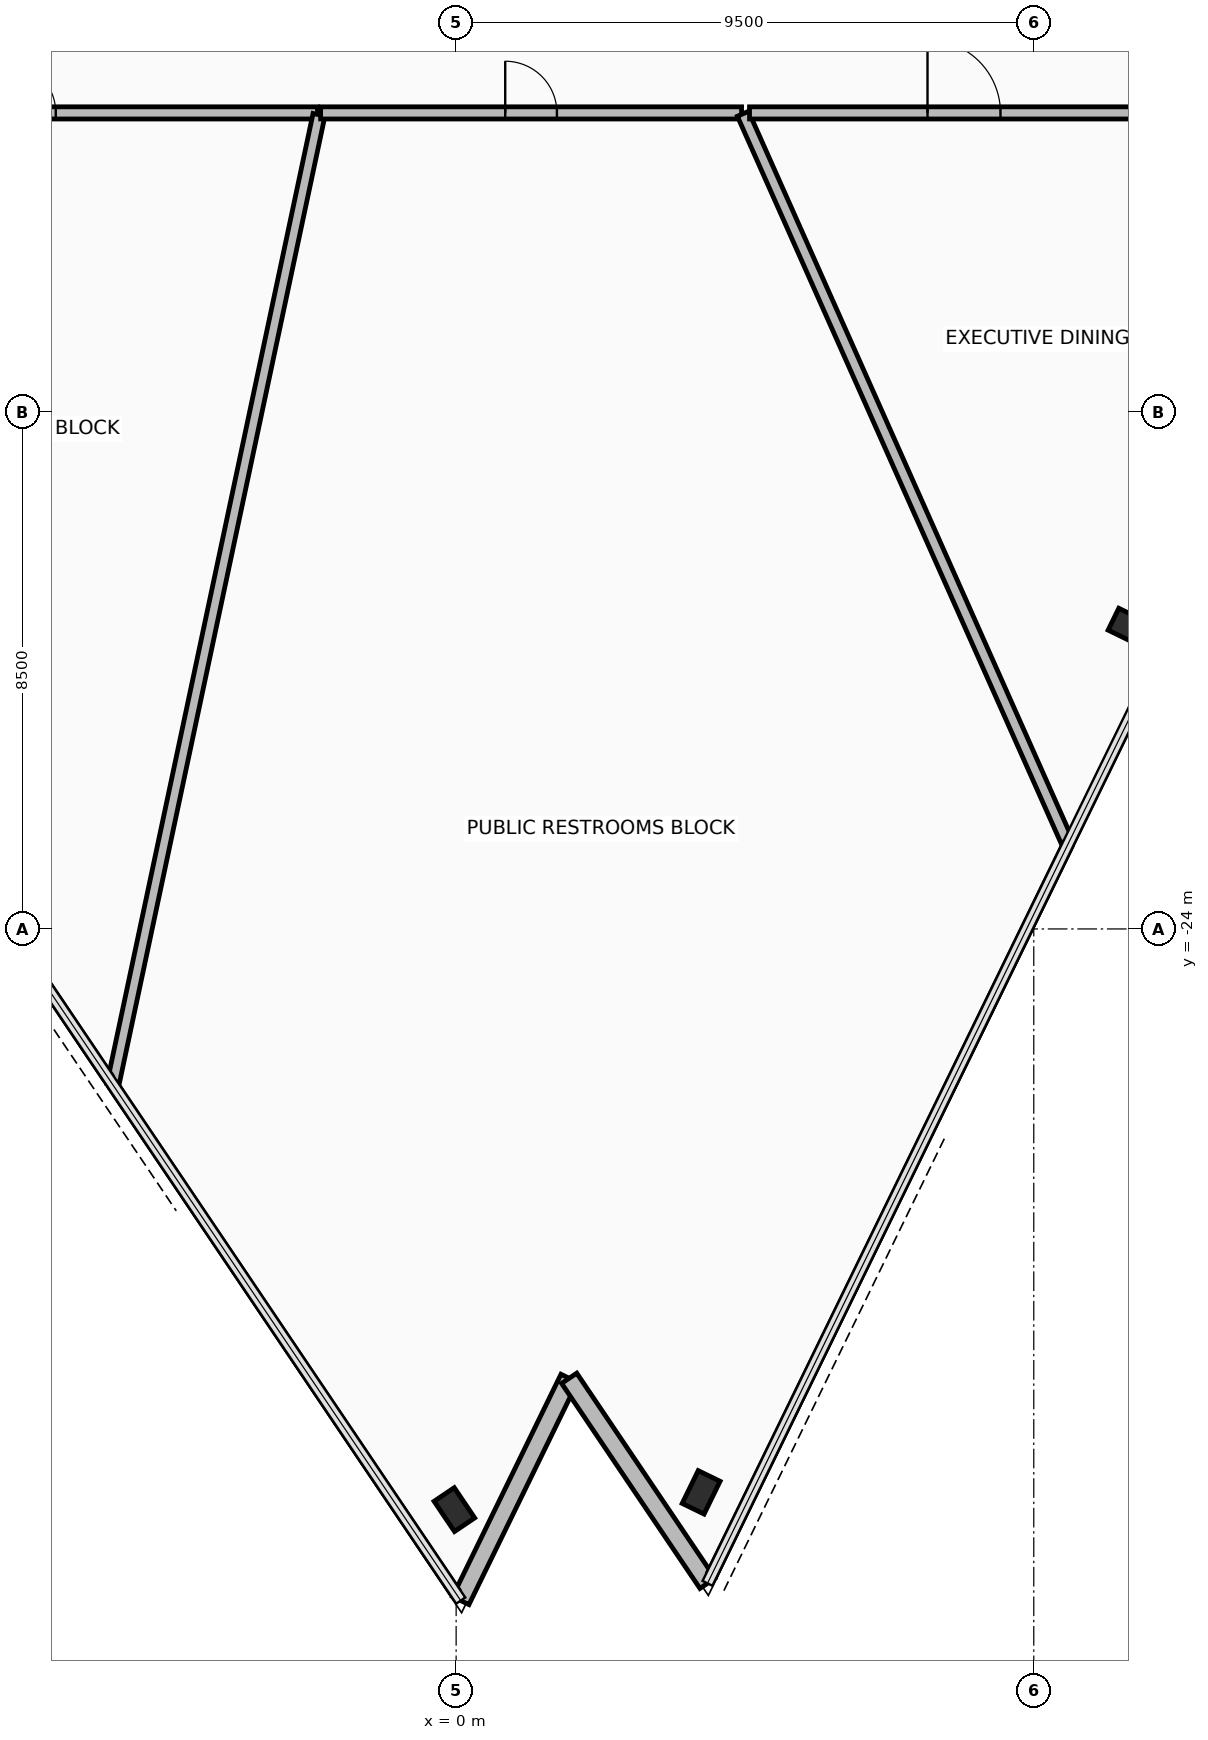
"""IFC4 building model, lengths in metres.
Left out: names, types, materials, properties, quantities, classifications, styles, units other than length and angle.
Written with IfcOpenShell. Run it as: python <this file> out.ifc"""

import sys

from ifc_helpers import new_model, si_unit, direction, frame, frame_2d, origin, origin_2d, place, context, subcontext, project, spatial, rectangle, hollow_rectangle, extrude, element, fill, save


model = new_model("IFC4")
c1 = context("Model", 3, precision=1e-05, world=origin(), true_north=direction((0.0, 1.0)))
c2 = subcontext(c1, "Body", "Model", "MODEL_VIEW")
j1 = project(units=[si_unit("LENGTHUNIT", "METRE"), si_unit("PLANEANGLEUNIT", "RADIAN")], contexts=[c1])
p1 = place(None, origin())
s1 = spatial("IfcSite", under=j1, at=p1, CompositionType="ELEMENT")
p2 = place(p1, origin())
s2 = spatial("IfcBuilding", under=s1, at=p2, CompositionType="ELEMENT")
p3 = place(p2, frame((0.0, 0.0, 260.6)))
s3 = spatial("IfcBuildingStorey", under=s2, at=p3, CompositionType="ELEMENT", Elevation=260.6)
for number, where, z_axis, x_axis in (
    (1, (-0.029, -33.549, 0.0), (0.0, 0.0, 1.0), (-0.559, 0.829, 0.0)),
    (2, (4.029, -33.265, 0.0), (0.0, 0.0, 1.0), (0.438, 0.899, 0.0)),
):
    element("IfcColumn", number, at=place(p3, frame(where, z_axis=z_axis, x_axis=x_axis)), inside=s3, PredefinedType="COLUMN", context=c2, shape_type="SweptSolid", body=[
        extrude(hollow_rectangle(XDim=0.4, YDim=0.6, WallThickness=0.03, at=origin_2d()), origin(), (0.0, 0.0, 1.0), 3.6),
    ])
p4 = place(p3, frame((10.99, -18.994, 0.0), z_axis=(0.0, 0.0, 1.0), x_axis=(0.43837271548, 0.898793281196, 0.0)))
e3 = element("IfcColumn", 3, at=p4, inside=s3, PredefinedType="COLUMN", context=c2, shape_type="SweptSolid", body=[
    extrude(hollow_rectangle(XDim=0.4, YDim=0.4, WallThickness=0.025, at=origin_2d()), origin(), (0.0, 0.0, 1.0), 3.6),
])
p5 = place(p3, frame((0.076, -35.045, 0.0), z_axis=(0.0, 0.0, 1.0), x_axis=(0.438357414153, 0.898800744024, 0.0)))
e4 = element("IfcWall", 4, at=p5, inside=s3, PredefinedType="STANDARD", context=c2, shape_type="SweptSolid", body=[
    extrude(rectangle(XDim=4.068, YDim=0.3, at=frame_2d((2.034, 0.0))), origin(), (0.0, 0.0, 1.0), 2.765),
])
p6 = place(p3, frame((1.859, -31.389, 0.0), z_axis=(0.0, 0.0, 1.0), x_axis=(0.559206900681, -0.829028131145, 0.0)))
e5 = element("IfcWall", 5, at=p6, inside=s3, PredefinedType="STANDARD", context=c2, shape_type="SweptSolid", body=[
    extrude(rectangle(XDim=4.068, YDim=0.3, at=frame_2d((2.034, 0.0))), origin(), (0.0, 0.0, 1.0), 2.765),
])
p7 = place(p3, frame((-11.741, -10.58, 0.0), z_axis=(0.0, 0.0, 1.0), x_axis=(1.0, 0.0, 0.0)))
e6 = element("IfcWall", 6, at=p7, inside=s3, PredefinedType="PARTITIONING", context=c2, shape_type="SweptSolid", body=[
    extrude(rectangle(XDim=9.461, YDim=0.2, at=frame_2d((4.73, 0.0))), origin(), (0.0, 0.0, 1.0), 2.915),
])
p8 = place(p7, frame((4.306, 0.0, 0.0)))
e7 = element("IfcOpeningElement", 7, at=p8, cuts=e6, PredefinedType="OPENING", context=c2, shape_type="SweptSolid", body=[
    extrude(rectangle(XDim=0.85, YDim=2.1, at=frame_2d((0.425, 1.05))), frame((0.0, 0.11, 0.0), z_axis=(0.0, -1.0, 0.0), x_axis=(1.0, 0.0, 0.0)), (0.0, 0.0, 1.0), 0.22),
])
p9 = place(p3, frame((-2.255, -10.61, 0.0), z_axis=(0.0, 0.0, 1.0), x_axis=(-0.207902262157, -0.97814960481, 0.0)))
e8 = element("IfcWall", 8, at=p9, inside=s3, PredefinedType="PARTITIONING", context=c2, shape_type="SweptSolid", body=[
    extrude(rectangle(XDim=16.309, YDim=0.2, at=frame_2d((8.154, 0.0))), origin(), (0.0, 0.0, 1.0), 2.765),
])
p10 = place(p3, frame((-5.728, -26.441, 0.0), z_axis=(0.0, 0.0, 1.0), x_axis=(-0.559188397691, 0.829040611724, 0.0)))
e9 = element("IfcWall", 9, at=p10, inside=s3, PredefinedType="PARTITIONING", context=c2, shape_type="SweptSolid", body=[
    extrude(rectangle(XDim=15.951, YDim=0.15, at=frame_2d((7.976, 0.0))), origin(), (0.0, 0.0, 1.0), 3.42),
])
p11 = place(p3, frame((-0.024, -34.897, 0.0), z_axis=(0.0, 0.0, 1.0), x_axis=(-0.559196847428, 0.829034912309, 0.0)))
e10 = element("IfcWall", 10, at=p11, inside=s3, PredefinedType="PARTITIONING", context=c2, shape_type="SweptSolid", body=[
    extrude(rectangle(XDim=10.043, YDim=0.15, at=frame_2d((5.021, 0.0))), origin(), (0.0, 0.0, 1.0), 3.42),
])
p12 = place(p3, frame((-2.229, -10.58, 0.0), z_axis=(0.0, 0.0, 1.0), x_axis=(1.0, 0.0, 0.0)))
e11 = element("IfcWall", 11, at=p12, inside=s3, PredefinedType="PARTITIONING", context=c2, shape_type="SweptSolid", body=[
    extrude(rectangle(XDim=6.923, YDim=0.2, at=frame_2d((3.461, 0.0))), origin(), (0.0, 0.0, 1.0), 3.42),
])
p13 = place(p12, frame((3.036, 0.0, 0.0)))
e12 = element("IfcOpeningElement", 12, at=p13, cuts=e11, PredefinedType="OPENING", context=c2, shape_type="SweptSolid", body=[
    extrude(rectangle(XDim=0.85, YDim=2.1, at=frame_2d((0.425, 1.05))), frame((0.0, 0.11, 0.0), z_axis=(0.0, -1.0, 0.0), x_axis=(1.0, 0.0, 0.0)), (0.0, 0.0, 1.0), 0.22),
])
p14 = place(p3, frame((4.717, -10.595, 0.0), z_axis=(0.0, 0.0, 1.0), x_axis=(0.406740308305, -0.913543825769, 0.0)))
e13 = element("IfcWall", 13, at=p14, inside=s3, PredefinedType="PARTITIONING", context=c2, shape_type="SweptSolid", body=[
    extrude(rectangle(XDim=13.134, YDim=0.2, at=frame_2d((6.567, 0.0))), origin(), (0.0, 0.0, 1.0), 2.765),
])
p15 = place(p3, frame((10.059, -22.614, 0.0), z_axis=(0.0, 0.0, 1.0), x_axis=(-0.438368087018, -0.898795538643, 0.0)))
e14 = element("IfcWall", 14, at=p15, inside=s3, PredefinedType="PARTITIONING", context=c2, shape_type="SweptSolid", body=[
    extrude(rectangle(XDim=13.336, YDim=0.15, at=frame_2d((6.668, 0.0))), origin(), (0.0, 0.0, 1.0), 3.42),
])
p16 = place(p3, frame((4.825, -10.58, 0.0), z_axis=(0.0, 0.0, 1.0), x_axis=(1.0, 0.0, 0.0)))
e15 = element("IfcWall", 15, at=p16, inside=s3, PredefinedType="PARTITIONING", context=c2, shape_type="SweptSolid", body=[
    extrude(rectangle(XDim=7.054, YDim=0.2, at=frame_2d((3.527, 0.0))), origin(), (0.0, 0.0, 1.0), 2.915),
])
p17 = place(p16, frame((2.927, 0.0, 0.0)))
e16 = element("IfcOpeningElement", 16, at=p17, cuts=e15, PredefinedType="OPENING", context=c2, shape_type="SweptSolid", body=[
    extrude(rectangle(XDim=1.2, YDim=2.15, at=frame_2d((0.6, 1.075))), frame((0.0, 0.11, 0.0), z_axis=(0.0, -1.0, 0.0), x_axis=(1.0, 0.0, 0.0)), (0.0, 0.0, 1.0), 0.22),
])
p18 = place(p8, origin())
e17 = element("IfcDoor", 17, at=p18, inside=s3, OperationType="SINGLE_SWING_RIGHT", PredefinedType="DOOR", context=c2, shape_type="SweptSolid", body=[
    extrude(rectangle(XDim=0.85, YDim=2.1, at=frame_2d((0.425, 1.05))), frame((0.0, 0.025, 0.0), z_axis=(0.0, -1.0, 0.0), x_axis=(1.0, 0.0, 0.0)), (0.0, 0.0, 1.0), 0.05),
])
fill(e7, e17)
p19 = place(p13, origin())
e18 = element("IfcDoor", 18, at=p19, inside=s3, OperationType="SINGLE_SWING_RIGHT", PredefinedType="DOOR", context=c2, shape_type="SweptSolid", body=[
    extrude(rectangle(XDim=0.85, YDim=2.1, at=frame_2d((0.425, 1.05))), frame((0.0, 0.025, 0.0), z_axis=(0.0, -1.0, 0.0), x_axis=(1.0, 0.0, 0.0)), (0.0, 0.0, 1.0), 0.05),
])
fill(e12, e18)
p20 = place(p17, origin())
e19 = element("IfcDoor", 19, at=p20, inside=s3, OperationType="SINGLE_SWING_LEFT", PredefinedType="DOOR", context=c2, shape_type="SweptSolid", body=[
    extrude(rectangle(XDim=1.2, YDim=2.15, at=frame_2d((0.6, 1.075))), frame((0.0, 0.025, 0.0), z_axis=(0.0, -1.0, 0.0), x_axis=(1.0, 0.0, 0.0)), (0.0, 0.0, 1.0), 0.05),
])
fill(e16, e19)
save(model, sys.argv[1])
